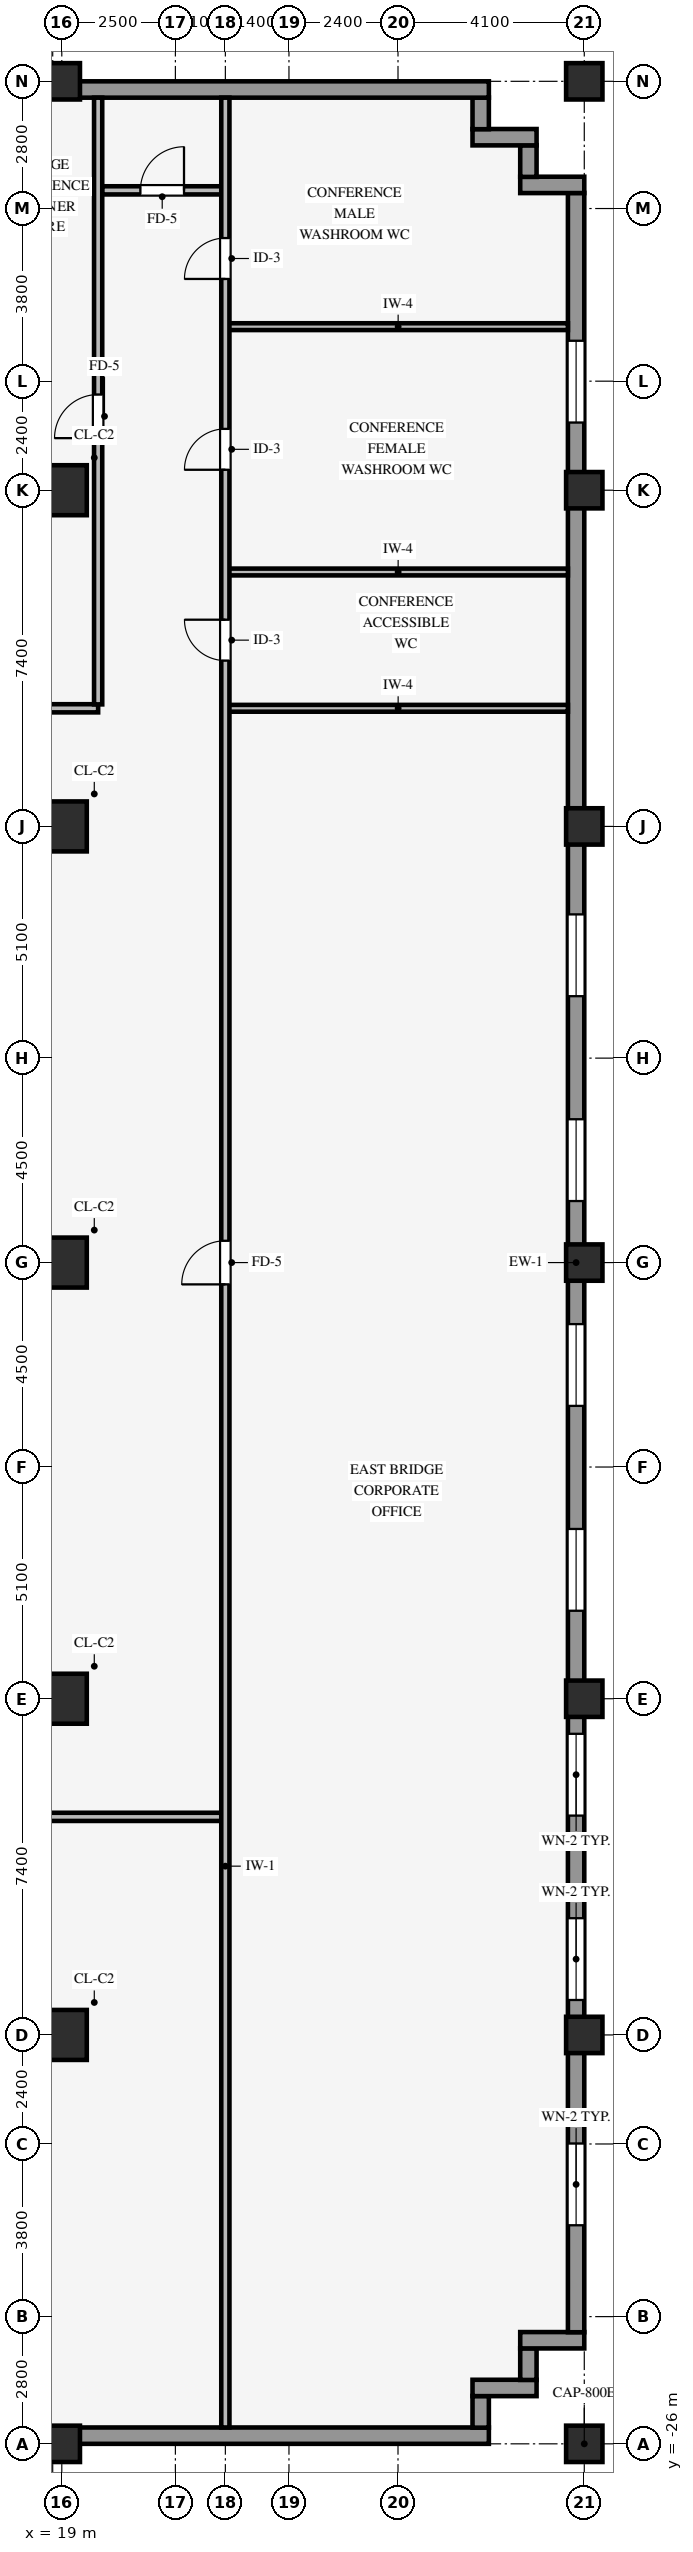
"""IFC4 building model, lengths in metres.
Left out: names, types, materials, properties, quantities, classifications, styles, units other than length and angle.
Written with IfcOpenShell. Run it as: python <this file> out.ifc"""

import sys

from ifc_helpers import new_model, si_unit, direction, frame, frame_2d, origin, origin_2d, place, context, subcontext, project, spatial, rectangle, hollow_rectangle, extrude, source, transform, mapped, element, fill, save


model = new_model("IFC4")
c1 = context("Model", 3, precision=1e-05, world=origin(), true_north=direction((0.0, 1.0)))
c2 = subcontext(c1, "Body", "Model", "MODEL_VIEW")
j1 = project(units=[si_unit("LENGTHUNIT", "METRE"), si_unit("PLANEANGLEUNIT", "RADIAN")], contexts=[c1])
p1 = place(None, origin())
s1 = spatial("IfcSite", under=j1, at=p1, CompositionType="ELEMENT")
p2 = place(p1, origin())
s2 = spatial("IfcBuilding", under=s1, at=p2, CompositionType="ELEMENT")
p3 = place(p2, frame((0.0, 0.0, 18.4)))
s3 = spatial("IfcBuildingStorey", under=s2, at=p3, CompositionType="ELEMENT", Elevation=18.4)
p4 = place(p3, frame((19.0, -26.0, 0.0), z_axis=(0.0, 0.0, 1.0), x_axis=(1.0, 0.0, 0.0)))
e1 = element("IfcColumn", 1, at=p4, inside=s3, PredefinedType="COLUMN", context=c2, shape_type="SweptSolid", body=[
    extrude(hollow_rectangle(XDim=0.8, YDim=0.8, WallThickness=0.055, InnerFilletRadius=0.055, OuterFilletRadius=0.11, at=origin_2d()), origin(), (0.0, 0.0, 1.0), 4.2),
])
for number, where, z_axis, x_axis in (
    (2, (19.0, -17.0, 0.0), (0.0, 0.0, 1.0), (1.0, 0.0, 0.0)),
    (3, (19.0, -9.6, 0.0), (0.0, 0.0, 1.0), (1.0, 0.0, 0.0)),
    (4, (19.0, 0.0, 0.0), (0.0, 0.0, 1.0), (1.0, 0.0, 0.0)),
    (5, (19.0, 9.6, 0.0), (0.0, 0.0, 1.0), (1.0, 0.0, 0.0)),
    (6, (19.0, 17.0, 0.0), (0.0, 0.0, 1.0), (1.0, 0.0, 0.0)),
):
    element("IfcColumn", number, at=place(p3, frame(where, z_axis=z_axis, x_axis=x_axis)), inside=s3, PredefinedType="COLUMN", context=c2, shape_type="SweptSolid", body=[
        extrude(rectangle(XDim=1.1, YDim=1.1, at=origin_2d()), origin(), (0.0, 0.0, 1.0), 4.2),
    ])
p5 = place(p3, frame((19.0, 26.0, 0.0), z_axis=(0.0, 0.0, 1.0), x_axis=(1.0, 0.0, 0.0)))
e7 = element("IfcColumn", 7, at=p5, inside=s3, PredefinedType="COLUMN", context=c2, shape_type="SweptSolid", body=[
    extrude(hollow_rectangle(XDim=0.8, YDim=0.8, WallThickness=0.055, InnerFilletRadius=0.055, OuterFilletRadius=0.11, at=origin_2d()), origin(), (0.0, 0.0, 1.0), 4.2),
])
p6 = place(p3, frame((30.5, -26.0, -0.4), z_axis=(0.0, 0.0, 1.0), x_axis=(1.0, 0.0, 0.0)))
e8 = element("IfcColumn", 8, at=p6, inside=s3, PredefinedType="COLUMN", context=c2, shape_type="SweptSolid", body=[
    extrude(hollow_rectangle(XDim=0.8, YDim=0.8, WallThickness=0.055, InnerFilletRadius=0.055, OuterFilletRadius=0.11, at=origin_2d()), origin(), (0.0, 0.0, 1.0), 4.6),
])
for number, where, z_axis, x_axis in (
    (9, (30.5, -17.0, 0.0), (0.0, 0.0, 1.0), (1.0, 0.0, 0.0)),
    (10, (30.5, -9.6, 0.0), (0.0, 0.0, 1.0), (1.0, 0.0, 0.0)),
    (11, (30.5, 0.0, 0.0), (0.0, 0.0, 1.0), (1.0, 0.0, 0.0)),
    (12, (30.5, 9.6, 0.0), (0.0, 0.0, 1.0), (1.0, 0.0, 0.0)),
    (13, (30.5, 17.0, 0.0), (0.0, 0.0, 1.0), (1.0, 0.0, 0.0)),
):
    element("IfcColumn", number, at=place(p3, frame(where, z_axis=z_axis, x_axis=x_axis)), inside=s3, PredefinedType="COLUMN", context=c2, shape_type="SweptSolid", body=[
        extrude(hollow_rectangle(XDim=0.8, YDim=0.8, WallThickness=0.055, InnerFilletRadius=0.055, OuterFilletRadius=0.11, at=origin_2d()), origin(), (0.0, 0.0, 1.0), 4.2),
    ])
p7 = place(p3, frame((30.5, 26.0, -0.4), z_axis=(0.0, 0.0, 1.0), x_axis=(1.0, 0.0, 0.0)))
e14 = element("IfcColumn", 14, at=p7, inside=s3, PredefinedType="COLUMN", context=c2, shape_type="SweptSolid", body=[
    extrude(hollow_rectangle(XDim=0.8, YDim=0.8, WallThickness=0.055, InnerFilletRadius=0.055, OuterFilletRadius=0.11, at=origin_2d()), origin(), (0.0, 0.0, 1.0), 4.6),
])
p8 = place(p3, frame((3.6, -25.82, 0.0), z_axis=(0.0, 0.0, 1.0), x_axis=(1.0, 0.0, 0.0)))
e15 = element("IfcWall", 15, at=p8, inside=s3, PredefinedType="STANDARD", context=c2, shape_type="SweptSolid", body=[
    extrude(rectangle(XDim=24.8, YDim=0.36, at=frame_2d((12.4, 0.0))), origin(), (0.0, 0.0, 1.0), 2.585),
])
p9 = place(p3, frame((28.22, -25.644, 0.0), z_axis=(0.0, 0.0, 1.0), x_axis=(0.0, 1.0, 0.0)))
e16 = element("IfcWall", 16, at=p9, inside=s3, PredefinedType="STANDARD", context=c2, shape_type="SweptSolid", body=[
    extrude(rectangle(XDim=0.698, YDim=0.36, at=frame_2d((0.349, 0.0))), origin(), (0.0, 0.0, 1.0), 4.19),
])
p10 = place(p3, frame((28.04, -24.77, 0.0), z_axis=(0.0, 0.0, 1.0), x_axis=(1.0, 0.0, 0.0)))
e17 = element("IfcWall", 17, at=p10, inside=s3, PredefinedType="STANDARD", context=c2, shape_type="SweptSolid", body=[
    extrude(rectangle(XDim=1.41, YDim=0.36, at=frame_2d((0.705, 0.0))), origin(), (0.0, 0.0, 1.0), 4.19),
])
p11 = place(p3, frame((29.27, -24.594, 0.0), z_axis=(0.0, 0.0, 1.0), x_axis=(0.0, 1.0, 0.0)))
e18 = element("IfcWall", 18, at=p11, inside=s3, PredefinedType="STANDARD", context=c2, shape_type="SweptSolid", body=[
    extrude(rectangle(XDim=0.698, YDim=0.36, at=frame_2d((0.349, 0.0))), origin(), (0.0, 0.0, 1.0), 4.19),
])
p12 = place(p3, frame((29.09, -23.72, 0.0), z_axis=(0.0, 0.0, 1.0), x_axis=(1.0, 0.0, 0.0)))
e19 = element("IfcWall", 19, at=p12, inside=s3, PredefinedType="STANDARD", context=c2, shape_type="SweptSolid", body=[
    extrude(rectangle(XDim=1.41, YDim=0.36, at=frame_2d((0.705, 0.0))), origin(), (0.0, 0.0, 1.0), 4.19),
])
p13 = place(p3, frame((30.32, -23.544, 0.0), z_axis=(0.0, 0.0, 1.0), x_axis=(0.0, 1.0, 0.0)))
e20 = element("IfcWall", 20, at=p13, inside=s3, PredefinedType="STANDARD", context=c2, shape_type="SweptSolid", body=[
    extrude(rectangle(XDim=47.088, YDim=0.36, at=frame_2d((23.544, 0.0))), origin(), (0.0, 0.0, 1.0), 3.535),
])
p14 = place(p13, frame((2.354, 0.0, 0.85)))
e21 = element("IfcOpeningElement", 21, at=p14, cuts=e20, PredefinedType="OPENING", context=c2, shape_type="SweptSolid", body=[
    extrude(rectangle(XDim=1.8, YDim=2.35, at=frame_2d((0.9, 1.175))), frame((0.0, 0.19, 0.0), z_axis=(0.0, -1.0, 0.0), x_axis=(1.0, 0.0, 0.0)), (0.0, 0.0, 1.0), 0.38),
])
p15 = place(p13, frame((7.313, 0.0, 0.85)))
e22 = element("IfcOpeningElement", 22, at=p15, cuts=e20, PredefinedType="OPENING", context=c2, shape_type="SweptSolid", body=[
    extrude(rectangle(XDim=1.8, YDim=2.35, at=frame_2d((0.9, 1.175))), frame((0.0, 0.19, 0.0), z_axis=(0.0, -1.0, 0.0), x_axis=(1.0, 0.0, 0.0)), (0.0, 0.0, 1.0), 0.38),
])
p16 = place(p13, frame((11.372, 0.0, 0.85)))
e23 = element("IfcOpeningElement", 23, at=p16, cuts=e20, PredefinedType="OPENING", context=c2, shape_type="SweptSolid", body=[
    extrude(rectangle(XDim=1.8, YDim=2.35, at=frame_2d((0.9, 1.175))), frame((0.0, 0.19, 0.0), z_axis=(0.0, -1.0, 0.0), x_axis=(1.0, 0.0, 0.0)), (0.0, 0.0, 1.0), 0.38),
])
p17 = place(p13, frame((15.881, 0.0, 0.85)))
e24 = element("IfcOpeningElement", 24, at=p17, cuts=e20, PredefinedType="OPENING", context=c2, shape_type="SweptSolid", body=[
    extrude(rectangle(XDim=1.8, YDim=2.35, at=frame_2d((0.9, 1.175))), frame((0.0, 0.19, 0.0), z_axis=(0.0, -1.0, 0.0), x_axis=(1.0, 0.0, 0.0)), (0.0, 0.0, 1.0), 0.38),
])
p18 = place(p13, frame((20.39, 0.0, 0.85)))
e25 = element("IfcOpeningElement", 25, at=p18, cuts=e20, PredefinedType="OPENING", context=c2, shape_type="SweptSolid", body=[
    extrude(rectangle(XDim=1.8, YDim=2.35, at=frame_2d((0.9, 1.175))), frame((0.0, 0.19, 0.0), z_axis=(0.0, -1.0, 0.0), x_axis=(1.0, 0.0, 0.0)), (0.0, 0.0, 1.0), 0.38),
])
p19 = place(p13, frame((24.898, 0.0, 0.85)))
e26 = element("IfcOpeningElement", 26, at=p19, cuts=e20, PredefinedType="OPENING", context=c2, shape_type="SweptSolid", body=[
    extrude(rectangle(XDim=1.8, YDim=2.35, at=frame_2d((0.9, 1.175))), frame((0.0, 0.19, 0.0), z_axis=(0.0, -1.0, 0.0), x_axis=(1.0, 0.0, 0.0)), (0.0, 0.0, 1.0), 0.38),
])
p20 = place(p13, frame((29.407, 0.0, 0.85)))
e27 = element("IfcOpeningElement", 27, at=p20, cuts=e20, PredefinedType="OPENING", context=c2, shape_type="SweptSolid", body=[
    extrude(rectangle(XDim=1.8, YDim=2.35, at=frame_2d((0.9, 1.175))), frame((0.0, 0.19, 0.0), z_axis=(0.0, -1.0, 0.0), x_axis=(1.0, 0.0, 0.0)), (0.0, 0.0, 1.0), 0.38),
])
p21 = place(p13, frame((42.034, 0.0, 0.85)))
e28 = element("IfcOpeningElement", 28, at=p21, cuts=e20, PredefinedType="OPENING", context=c2, shape_type="SweptSolid", body=[
    extrude(rectangle(XDim=1.8, YDim=2.35, at=frame_2d((0.9, 1.175))), frame((0.0, 0.19, 0.0), z_axis=(0.0, -1.0, 0.0), x_axis=(1.0, 0.0, 0.0)), (0.0, 0.0, 1.0), 0.38),
])
p22 = place(p3, frame((29.09, 23.72, 0.0), z_axis=(0.0, 0.0, 1.0), x_axis=(1.0, 0.0, 0.0)))
e29 = element("IfcWall", 29, at=p22, inside=s3, PredefinedType="STANDARD", context=c2, shape_type="SweptSolid", body=[
    extrude(rectangle(XDim=1.41, YDim=0.36, at=frame_2d((0.705, 0.0))), origin(), (0.0, 0.0, 1.0), 4.19),
])
p23 = place(p3, frame((29.27, 23.896, 0.0), z_axis=(0.0, 0.0, 1.0), x_axis=(0.0, 1.0, 0.0)))
e30 = element("IfcWall", 30, at=p23, inside=s3, PredefinedType="STANDARD", context=c2, shape_type="SweptSolid", body=[
    extrude(rectangle(XDim=0.698, YDim=0.36, at=frame_2d((0.349, 0.0))), origin(), (0.0, 0.0, 1.0), 4.19),
])
p24 = place(p3, frame((28.04, 24.77, 0.0), z_axis=(0.0, 0.0, 1.0), x_axis=(1.0, 0.0, 0.0)))
e31 = element("IfcWall", 31, at=p24, inside=s3, PredefinedType="STANDARD", context=c2, shape_type="SweptSolid", body=[
    extrude(rectangle(XDim=1.41, YDim=0.36, at=frame_2d((0.705, 0.0))), origin(), (0.0, 0.0, 1.0), 4.19),
])
p25 = place(p3, frame((28.22, 24.946, 0.0), z_axis=(0.0, 0.0, 1.0), x_axis=(0.0, 1.0, 0.0)))
e32 = element("IfcWall", 32, at=p25, inside=s3, PredefinedType="STANDARD", context=c2, shape_type="SweptSolid", body=[
    extrude(rectangle(XDim=0.698, YDim=0.36, at=frame_2d((0.349, 0.0))), origin(), (0.0, 0.0, 1.0), 4.19),
])
p26 = place(p3, frame((3.6, 25.82, 0.0), z_axis=(0.0, 0.0, 1.0), x_axis=(1.0, 0.0, 0.0)))
e33 = element("IfcWall", 33, at=p26, inside=s3, PredefinedType="STANDARD", context=c2, shape_type="SweptSolid", body=[
    extrude(rectangle(XDim=24.8, YDim=0.36, at=frame_2d((12.4, 0.0))), origin(), (0.0, 0.0, 1.0), 2.585),
])
p27 = place(p3, frame((-8.8, -12.2, 0.0), z_axis=(0.0, 0.0, 1.0), x_axis=(1.0, 0.0, 0.0)))
e34 = element("IfcWall", 34, at=p27, inside=s3, PredefinedType="PARTITIONING", context=c2, shape_type="SweptSolid", body=[
    extrude(rectangle(XDim=31.334, YDim=0.18, at=frame_2d((15.667, 0.0))), origin(), (0.0, 0.0, 1.0), 4.19),
])
p28 = place(p27, frame((8.32, 0.0, 0.0)))
e35 = element("IfcOpeningElement", 35, at=p28, cuts=e34, PredefinedType="OPENING", context=c2, shape_type="SweptSolid", body=[
    extrude(rectangle(XDim=0.96, YDim=2.1, at=frame_2d((0.48, 1.05))), frame((0.0, 0.1, 0.0), z_axis=(0.0, -1.0, 0.0), x_axis=(1.0, 0.0, 0.0)), (0.0, 0.0, 1.0), 0.2),
])
p29 = place(p27, frame((22.62, 0.0, 0.0)))
e36 = element("IfcOpeningElement", 36, at=p29, cuts=e34, PredefinedType="OPENING", context=c2, shape_type="SweptSolid", body=[
    extrude(rectangle(XDim=0.96, YDim=2.1, at=frame_2d((0.48, 1.05))), frame((0.0, 0.1, 0.0), z_axis=(0.0, -1.0, 0.0), x_axis=(1.0, 0.0, 0.0)), (0.0, 0.0, 1.0), 0.2),
])
p30 = place(p3, frame((-8.8, 12.2, 0.0), z_axis=(0.0, 0.0, 1.0), x_axis=(1.0, 0.0, 0.0)))
e37 = element("IfcWall", 37, at=p30, inside=s3, PredefinedType="PARTITIONING", context=c2, shape_type="SweptSolid", body=[
    extrude(rectangle(XDim=28.6, YDim=0.18, at=frame_2d((14.3, 0.0))), origin(), (0.0, 0.0, 1.0), 4.19),
])
p31 = place(p30, frame((8.32, 0.0, 0.0)))
e38 = element("IfcOpeningElement", 38, at=p31, cuts=e37, PredefinedType="OPENING", context=c2, shape_type="SweptSolid", body=[
    extrude(rectangle(XDim=0.96, YDim=2.1, at=frame_2d((0.48, 1.05))), frame((0.0, 0.1, 0.0), z_axis=(0.0, -1.0, 0.0), x_axis=(1.0, 0.0, 0.0)), (0.0, 0.0, 1.0), 0.2),
])
for number, where, z_axis, x_axis in (
    (39, (22.666, 12.2, 0.0), (0.0, 0.0, 1.0), (1.0, 0.0, 0.0)),
    (40, (22.666, 15.2, 0.0), (0.0, 0.0, 1.0), (1.0, 0.0, 0.0)),
    (41, (22.666, 20.6, 0.0), (0.0, 0.0, 1.0), (1.0, 0.0, 0.0)),
):
    element("IfcWall", number, at=place(p3, frame(where, z_axis=z_axis, x_axis=x_axis)), inside=s3, PredefinedType="PARTITIONING", context=c2, shape_type="SweptSolid", body=[
        extrude(rectangle(XDim=7.474, YDim=0.15, at=frame_2d((3.737, 0.0))), origin(), (0.0, 0.0, 1.0), 4.19),
    ])
p32 = place(p3, frame((19.886, 23.6, 0.0), z_axis=(0.0, 0.0, 1.0), x_axis=(1.0, 0.0, 0.0)))
e42 = element("IfcWall", 42, at=p32, inside=s3, PredefinedType="PARTITIONING", context=c2, shape_type="SweptSolid", body=[
    extrude(rectangle(XDim=2.648, YDim=0.18, at=frame_2d((1.324, 0.0))), origin(), (0.0, 0.0, 1.0), 4.19),
])
p33 = place(p32, frame((0.844, 0.0, 0.0)))
e43 = element("IfcOpeningElement", 43, at=p33, cuts=e42, PredefinedType="OPENING", context=c2, shape_type="SweptSolid", body=[
    extrude(rectangle(XDim=0.96, YDim=2.1, at=frame_2d((0.48, 1.05))), frame((0.0, 0.1, 0.0), z_axis=(0.0, -1.0, 0.0), x_axis=(1.0, 0.0, 0.0)), (0.0, 0.0, 1.0), 0.2),
])
p34 = place(p3, frame((19.8, 12.286, 0.0), z_axis=(0.0, 0.0, 1.0), x_axis=(0.0, 1.0, 0.0)))
e44 = element("IfcWall", 44, at=p34, inside=s3, PredefinedType="PARTITIONING", context=c2, shape_type="SweptSolid", body=[
    extrude(rectangle(XDim=13.354, YDim=0.18, at=frame_2d((6.677, 0.0))), origin(), (0.0, 0.0, 1.0), 4.19),
])
p35 = place(p34, frame((5.86, 0.0, 0.0)))
e45 = element("IfcOpeningElement", 45, at=p35, cuts=e44, PredefinedType="OPENING", context=c2, shape_type="SweptSolid", body=[
    extrude(rectangle(XDim=0.96, YDim=2.1, at=frame_2d((0.48, 1.05))), frame((0.0, 0.1, 0.0), z_axis=(0.0, -1.0, 0.0), x_axis=(1.0, 0.0, 0.0)), (0.0, 0.0, 1.0), 0.2),
])
p36 = place(p3, frame((22.6, -25.64, 0.0), z_axis=(0.0, 0.0, 1.0), x_axis=(0.0, 1.0, 0.0)))
e46 = element("IfcWall", 46, at=p36, inside=s3, PredefinedType="PARTITIONING", context=c2, shape_type="SweptSolid", body=[
    extrude(rectangle(XDim=51.28, YDim=0.18, at=frame_2d((25.64, 0.0))), origin(), (0.0, 0.0, 1.0), 4.19),
])
p37 = place(p36, frame((25.16, 0.0, 0.0)))
e47 = element("IfcOpeningElement", 47, at=p37, cuts=e46, PredefinedType="OPENING", context=c2, shape_type="SweptSolid", body=[
    extrude(rectangle(XDim=0.96, YDim=2.1, at=frame_2d((0.48, 1.05))), frame((0.0, 0.1, 0.0), z_axis=(0.0, -1.0, 0.0), x_axis=(1.0, 0.0, 0.0)), (0.0, 0.0, 1.0), 0.2),
])
p38 = place(p36, frame((43.09, 0.0, 0.0)))
e48 = element("IfcOpeningElement", 48, at=p38, cuts=e46, PredefinedType="OPENING", context=c2, shape_type="SweptSolid", body=[
    extrude(rectangle(XDim=0.9, YDim=2.1, at=frame_2d((0.45, 1.05))), frame((0.0, 0.1, 0.0), z_axis=(0.0, -1.0, 0.0), x_axis=(1.0, 0.0, 0.0)), (0.0, 0.0, 1.0), 0.2),
])
p39 = place(p36, frame((38.89, 0.0, 0.0)))
e49 = element("IfcOpeningElement", 49, at=p39, cuts=e46, PredefinedType="OPENING", context=c2, shape_type="SweptSolid", body=[
    extrude(rectangle(XDim=0.9, YDim=2.1, at=frame_2d((0.45, 1.05))), frame((0.0, 0.1, 0.0), z_axis=(0.0, -1.0, 0.0), x_axis=(1.0, 0.0, 0.0)), (0.0, 0.0, 1.0), 0.2),
])
p40 = place(p36, frame((47.29, 0.0, 0.0)))
e50 = element("IfcOpeningElement", 50, at=p40, cuts=e46, PredefinedType="OPENING", context=c2, shape_type="SweptSolid", body=[
    extrude(rectangle(XDim=0.9, YDim=2.1, at=frame_2d((0.45, 1.05))), frame((0.0, 0.1, 0.0), z_axis=(0.0, -1.0, 0.0), x_axis=(1.0, 0.0, 0.0)), (0.0, 0.0, 1.0), 0.2),
])
m1 = source(origin(), c2, "Body", "SweptSolid", [
    extrude(rectangle(XDim=1.8, YDim=2.35, at=frame_2d((0.9, 1.175))), frame((0.0, 0.03, 0.0), z_axis=(0.0, -1.0, 0.0), x_axis=(1.0, 0.0, 0.0)), (0.0, 0.0, 1.0), 0.06),
])
p41 = place(p14, origin())
e51 = element("IfcWindow", 51, at=p41, inside=s3, PartitioningType="SINGLE_PANEL", PredefinedType="WINDOW", context=c2, shape_type="MappedRepresentation", body=[
    mapped(m1, transform((0.0, 0.0, 0.0), scale=1.0)),
])
fill(e21, e51)
p42 = place(p15, origin())
e52 = element("IfcWindow", 52, at=p42, inside=s3, PartitioningType="SINGLE_PANEL", PredefinedType="WINDOW", context=c2, shape_type="MappedRepresentation", body=[
    mapped(m1, transform((0.0, 0.0, 0.0), scale=1.0)),
])
fill(e22, e52)
p43 = place(p16, origin())
e53 = element("IfcWindow", 53, at=p43, inside=s3, PartitioningType="SINGLE_PANEL", PredefinedType="WINDOW", context=c2, shape_type="MappedRepresentation", body=[
    mapped(m1, transform((0.0, 0.0, 0.0), scale=1.0)),
])
fill(e23, e53)
p44 = place(p17, origin())
e54 = element("IfcWindow", 54, at=p44, inside=s3, PartitioningType="SINGLE_PANEL", PredefinedType="WINDOW", context=c2, shape_type="MappedRepresentation", body=[
    mapped(m1, transform((0.0, 0.0, 0.0), scale=1.0)),
])
fill(e24, e54)
p45 = place(p18, origin())
e55 = element("IfcWindow", 55, at=p45, inside=s3, PartitioningType="SINGLE_PANEL", PredefinedType="WINDOW", context=c2, shape_type="MappedRepresentation", body=[
    mapped(m1, transform((0.0, 0.0, 0.0), scale=1.0)),
])
fill(e25, e55)
p46 = place(p19, origin())
e56 = element("IfcWindow", 56, at=p46, inside=s3, PartitioningType="SINGLE_PANEL", PredefinedType="WINDOW", context=c2, shape_type="MappedRepresentation", body=[
    mapped(m1, transform((0.0, 0.0, 0.0), scale=1.0)),
])
fill(e26, e56)
p47 = place(p20, origin())
e57 = element("IfcWindow", 57, at=p47, inside=s3, PartitioningType="SINGLE_PANEL", PredefinedType="WINDOW", context=c2, shape_type="MappedRepresentation", body=[
    mapped(m1, transform((0.0, 0.0, 0.0), scale=1.0)),
])
fill(e27, e57)
p48 = place(p21, origin())
e58 = element("IfcWindow", 58, at=p48, inside=s3, PartitioningType="SINGLE_PANEL", PredefinedType="WINDOW", context=c2, shape_type="MappedRepresentation", body=[
    mapped(m1, transform((0.0, 0.0, 0.0), scale=1.0)),
])
fill(e28, e58)
m2 = source(origin(), c2, "Body", "SweptSolid", [
    extrude(rectangle(XDim=0.96, YDim=2.1, at=frame_2d((0.48, 1.05))), frame((0.0, 0.025, 0.0), z_axis=(0.0, -1.0, 0.0), x_axis=(1.0, 0.0, 0.0)), (0.0, 0.0, 1.0), 0.05),
])
p49 = place(p37, origin())
e59 = element("IfcDoor", 59, at=p49, inside=s3, OperationType="SINGLE_SWING_LEFT", PredefinedType="DOOR", context=c2, shape_type="MappedRepresentation", body=[
    mapped(m2, transform((0.0, 0.0, 0.0), scale=1.0)),
])
fill(e47, e59)
p50 = place(p35, origin())
e60 = element("IfcDoor", 60, at=p50, inside=s3, OperationType="SINGLE_SWING_LEFT", PredefinedType="DOOR", context=c2, shape_type="MappedRepresentation", body=[
    mapped(m2, transform((0.0, 0.0, 0.0), scale=1.0)),
])
fill(e45, e60)
m3 = source(origin(), c2, "Body", "SweptSolid", [
    extrude(rectangle(XDim=0.9, YDim=2.1, at=frame_2d((0.45, 1.05))), frame((0.0, 0.025, 0.0), z_axis=(0.0, -1.0, 0.0), x_axis=(1.0, 0.0, 0.0)), (0.0, 0.0, 1.0), 0.05),
])
p51 = place(p38, origin())
e61 = element("IfcDoor", 61, at=p51, inside=s3, OperationType="SINGLE_SWING_LEFT", PredefinedType="DOOR", context=c2, shape_type="MappedRepresentation", body=[
    mapped(m3, transform((0.0, 0.0, 0.0), scale=1.0)),
])
fill(e48, e61)
p52 = place(p39, origin())
e62 = element("IfcDoor", 62, at=p52, inside=s3, OperationType="SINGLE_SWING_RIGHT", PredefinedType="DOOR", context=c2, shape_type="MappedRepresentation", body=[
    mapped(m3, transform((0.0, 0.0, 0.0), scale=1.0)),
])
fill(e49, e62)
p53 = place(p40, origin())
e63 = element("IfcDoor", 63, at=p53, inside=s3, OperationType="SINGLE_SWING_LEFT", PredefinedType="DOOR", context=c2, shape_type="MappedRepresentation", body=[
    mapped(m3, transform((0.0, 0.0, 0.0), scale=1.0)),
])
fill(e50, e63)
p54 = place(p33, origin())
e64 = element("IfcDoor", 64, at=p54, inside=s3, OperationType="SINGLE_SWING_RIGHT", PredefinedType="DOOR", context=c2, shape_type="MappedRepresentation", body=[
    mapped(m2, transform((0.0, 0.0, 0.0), scale=1.0)),
])
fill(e43, e64)
save(model, sys.argv[1])
